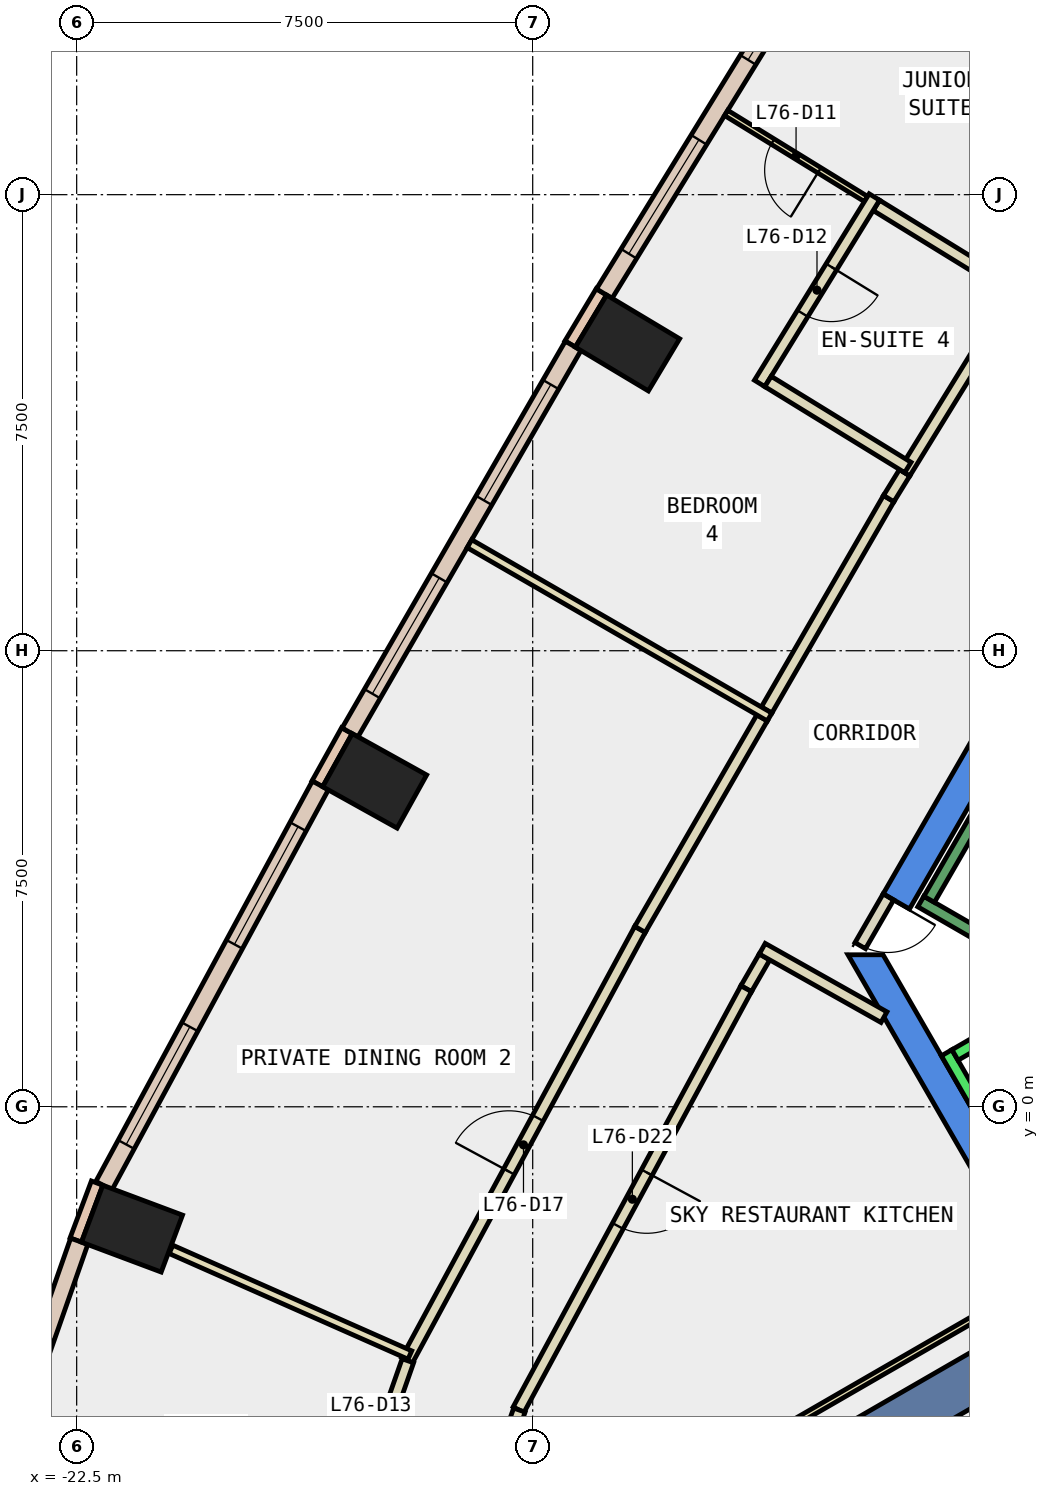
"""IFC4 building model, lengths in metres.
Left out: names, types, materials, properties, quantities, classifications, styles, units other than length and angle.
Written with IfcOpenShell. Run it as: python <this file> out.ifc"""

import sys

from ifc_helpers import new_model, si_unit, direction, frame, frame_2d, origin, origin_2d, place, context, subcontext, project, spatial, polyline, rectangle, outline, extrude, element, fill, save


model = new_model("IFC4")
c1 = context("Model", 3, precision=1e-05, world=origin(), true_north=direction((0.0, 1.0)))
c2 = subcontext(c1, "Body", "Model", "MODEL_VIEW")
j1 = project(units=[si_unit("LENGTHUNIT", "METRE"), si_unit("PLANEANGLEUNIT", "RADIAN")], contexts=[c1])
p1 = place(None, origin())
s1 = spatial("IfcSite", under=j1, at=p1, CompositionType="ELEMENT")
p2 = place(p1, origin())
s2 = spatial("IfcBuilding", under=s1, at=p2, CompositionType="ELEMENT")
p3 = place(p2, frame((0.0, 0.0, 322.4)))
s3 = spatial("IfcBuildingStorey", under=s2, at=p3, CompositionType="ELEMENT", Elevation=322.4)
for number, where, z_axis, x_axis in (
    (1, (-13.441, 12.561, -0.34), (0.0, 0.0, 1.0), (0.514, 0.858, 0.0)),
    (2, (-17.599, 5.36, -0.34), (0.0, 0.0, 1.0), (0.486, 0.874, 0.0)),
    (3, (-21.59, -2.004, -0.34), (0.0, 0.0, 1.0), (0.351, 0.936, 0.0)),
):
    element("IfcColumn", number, at=place(p3, frame(where, z_axis=z_axis, x_axis=x_axis)), inside=s3, PredefinedType="COLUMN", context=c2, shape_type="SweptSolid", body=[
        extrude(rectangle(XDim=1.0, YDim=1.4, at=origin_2d()), origin(), (0.0, 0.0, 1.0), 3.34),
    ])
p4 = place(p3, frame((0.0, 0.0, -0.34)))
e4 = element("IfcWall", 4, at=p4, inside=s3, PredefinedType="SHEAR", context=c2, shape_type="SweptSolid", body=[
    extrude(outline(polyline([(-9.236, 3.502), (-8.803, 3.253), (-4.619, 10.5), (-4.907, 11.0), (-9.236, 3.502)])), origin(), (0.0, 0.0, 1.0), 3.34),
])
p5 = place(p3, frame((0.0, 0.0, -0.34)))
e5 = element("IfcWall", 5, at=p5, inside=s3, PredefinedType="SHEAR", context=c2, shape_type="SweptSolid", body=[
    extrude(outline(polyline([(-9.815, 2.5), (-4.907, -6.0), (-4.619, -5.5), (-9.238, 2.5), (-9.815, 2.5)])), origin(), (0.0, 0.0, 1.0), 3.34),
])
p6 = place(p3, frame((-6.279, -3.625, -0.34), z_axis=(0.0, 0.0, 1.0), x_axis=(-0.866017533419, -0.500013631625, 0.0)))
e6 = element("IfcWall", 6, at=p6, inside=s3, PredefinedType="SHEAR", context=c2, shape_type="SweptSolid", body=[
    extrude(rectangle(XDim=9.0, YDim=0.8, at=frame_2d((4.5, 0.0))), origin(), (0.0, 0.0, 1.0), 3.34),
])
p7 = place(p3, frame((-13.87, 13.402, 0.0), z_axis=(0.0, 0.0, 1.0), x_axis=(-0.513777707721, -0.857923345672, 0.0)))
e7 = element("IfcWall", 7, at=p7, inside=s3, PredefinedType="STANDARD", context=c2, shape_type="SweptSolid", body=[
    extrude(rectangle(XDim=1.0, YDim=0.2, at=frame_2d((0.5, 0.0))), origin(), (0.0, 0.0, 1.0), 3.0),
])
p8 = place(p3, frame((-18.056, 6.185, 0.0), z_axis=(0.0, 0.0, 1.0), x_axis=(-0.486036693078, -0.873938403425, 0.0)))
e8 = element("IfcWall", 8, at=p8, inside=s3, PredefinedType="STANDARD", context=c2, shape_type="SweptSolid", body=[
    extrude(rectangle(XDim=1.0, YDim=0.2, at=frame_2d((0.5, 0.0))), origin(), (0.0, 0.0, 1.0), 3.0),
])
p9 = place(p3, frame((-22.164, -1.255, 0.0), z_axis=(0.0, 0.0, 1.0), x_axis=(-0.350962844851, -0.936389385637, 0.0)))
e9 = element("IfcWall", 9, at=p9, inside=s3, PredefinedType="STANDARD", context=c2, shape_type="SweptSolid", body=[
    extrude(rectangle(XDim=1.0, YDim=0.2, at=frame_2d((0.5, 0.0))), origin(), (0.0, 0.0, 1.0), 3.0),
])
p10 = place(p3, frame((-9.901, 19.747, 0.0), z_axis=(0.0, 0.0, 1.0), x_axis=(-0.524004608874, -0.851715427757, 0.0)))
e10 = element("IfcWall", 10, at=p10, inside=s3, PredefinedType="STANDARD", context=c2, shape_type="SweptSolid", body=[
    extrude(rectangle(XDim=7.485, YDim=0.3, at=frame_2d((3.742, 0.0))), origin(), (0.0, 0.0, 1.0), 3.0),
])
p11 = place(p10, frame((0.771, 0.0, 0.9)))
e11 = element("IfcOpeningElement", 11, at=p11, cuts=e10, PredefinedType="OPENING", context=c2, shape_type="SweptSolid", body=[
    extrude(rectangle(XDim=2.2, YDim=2.0, at=frame_2d((1.1, 1.0))), frame((0.0, 0.16, 0.0), z_axis=(0.0, -1.0, 0.0), x_axis=(1.0, 0.0, 0.0)), (0.0, 0.0, 1.0), 0.32),
])
p12 = place(p10, frame((4.514, 0.0, 0.9)))
e12 = element("IfcOpeningElement", 12, at=p12, cuts=e10, PredefinedType="OPENING", context=c2, shape_type="SweptSolid", body=[
    extrude(rectangle(XDim=2.2, YDim=2.0, at=frame_2d((1.1, 1.0))), frame((0.0, 0.16, 0.0), z_axis=(0.0, -1.0, 0.0), x_axis=(1.0, 0.0, 0.0)), (0.0, 0.0, 1.0), 0.32),
])
p13 = place(p3, frame((-14.334, 12.515, 0.0), z_axis=(0.0, 0.0, 1.0), x_axis=(-0.499958474759, -0.866049377066, 0.0)))
e13 = element("IfcWall", 13, at=p13, inside=s3, PredefinedType="STANDARD", context=c2, shape_type="SweptSolid", body=[
    extrude(rectangle(XDim=7.342, YDim=0.3, at=frame_2d((3.671, 0.0))), origin(), (0.0, 0.0, 1.0), 3.0),
])
p14 = place(p13, frame((0.736, 0.0, 0.9)))
e14 = element("IfcOpeningElement", 14, at=p14, cuts=e13, PredefinedType="OPENING", context=c2, shape_type="SweptSolid", body=[
    extrude(rectangle(XDim=2.2, YDim=2.0, at=frame_2d((1.1, 1.0))), frame((0.0, 0.16, 0.0), z_axis=(0.0, -1.0, 0.0), x_axis=(1.0, 0.0, 0.0)), (0.0, 0.0, 1.0), 0.32),
])
p15 = place(p13, frame((4.407, 0.0, 0.9)))
e15 = element("IfcOpeningElement", 15, at=p15, cuts=e13, PredefinedType="OPENING", context=c2, shape_type="SweptSolid", body=[
    extrude(rectangle(XDim=2.2, YDim=2.0, at=frame_2d((1.1, 1.0))), frame((0.0, 0.16, 0.0), z_axis=(0.0, -1.0, 0.0), x_axis=(1.0, 0.0, 0.0)), (0.0, 0.0, 1.0), 0.32),
])
p16 = place(p3, frame((-18.492, 5.285, 0.0), z_axis=(0.0, 0.0, 1.0), x_axis=(-0.475690331633, -0.879612817319, 0.0)))
e16 = element("IfcWall", 16, at=p16, inside=s3, PredefinedType="STANDARD", context=c2, shape_type="SweptSolid", body=[
    extrude(rectangle(XDim=7.484, YDim=0.3, at=frame_2d((3.742, 0.0))), origin(), (0.0, 0.0, 1.0), 3.0),
])
p17 = place(p16, frame((0.771, 0.0, 0.9)))
e17 = element("IfcOpeningElement", 17, at=p17, cuts=e16, PredefinedType="OPENING", context=c2, shape_type="SweptSolid", body=[
    extrude(rectangle(XDim=2.2, YDim=2.0, at=frame_2d((1.1, 1.0))), frame((0.0, 0.16, 0.0), z_axis=(0.0, -1.0, 0.0), x_axis=(1.0, 0.0, 0.0)), (0.0, 0.0, 1.0), 0.32),
])
p18 = place(p16, frame((4.513, 0.0, 0.9)))
e18 = element("IfcOpeningElement", 18, at=p18, cuts=e16, PredefinedType="OPENING", context=c2, shape_type="SweptSolid", body=[
    extrude(rectangle(XDim=2.2, YDim=2.0, at=frame_2d((1.1, 1.0))), frame((0.0, 0.16, 0.0), z_axis=(0.0, -1.0, 0.0), x_axis=(1.0, 0.0, 0.0)), (0.0, 0.0, 1.0), 0.32),
])
p19 = place(p3, frame((-22.458, -2.212, 0.0), z_axis=(0.0, 0.0, 1.0), x_axis=(-0.330923030855, -0.943657749213, 0.0)))
e19 = element("IfcWall", 19, at=p19, inside=s3, PredefinedType="STANDARD", context=c2, shape_type="SweptSolid", body=[
    extrude(rectangle(XDim=4.748, YDim=0.3, at=frame_2d((2.374, 0.0))), origin(), (0.0, 0.0, 1.0), 3.0),
])
p20 = place(p19, frame((1.674, 0.0, 0.9)))
e20 = element("IfcOpeningElement", 20, at=p20, cuts=e19, PredefinedType="OPENING", context=c2, shape_type="SweptSolid", body=[
    extrude(rectangle(XDim=1.4, YDim=2.0, at=frame_2d((0.7, 1.0))), frame((0.0, 0.16, 0.0), z_axis=(0.0, -1.0, 0.0), x_axis=(1.0, 0.0, 0.0)), (0.0, 0.0, 1.0), 0.32),
])
p21 = place(p3, frame((-11.188, 2.464, 0.0), z_axis=(0.0, 0.0, 1.0), x_axis=(-0.499406844493, -0.866367591542, 0.0)))
e21 = element("IfcWall", 21, at=p21, inside=s3, PredefinedType="PARTITIONING", context=c2, shape_type="SweptSolid", body=[
    extrude(rectangle(XDim=0.603, YDim=0.2, at=frame_2d((0.301, 0.0))), origin(), (0.0, 0.0, 1.0), 3.0),
])
p22 = place(p3, frame((-11.489, 1.942, 0.0), z_axis=(0.0, 0.0, 1.0), x_axis=(-0.475643534049, -0.879638123615, 0.0)))
e22 = element("IfcWall", 22, at=p22, inside=s3, PredefinedType="PARTITIONING", context=c2, shape_type="SweptSolid", body=[
    extrude(rectangle(XDim=7.871, YDim=0.2, at=frame_2d((3.936, 0.0))), origin(), (0.0, 0.0, 1.0), 3.0),
])
p23 = place(p22, frame((3.436, 0.0, 0.0)))
e23 = element("IfcOpeningElement", 23, at=p23, cuts=e22, PredefinedType="OPENING", context=c2, shape_type="SweptSolid", body=[
    extrude(rectangle(XDim=1.0, YDim=2.1, at=frame_2d((0.5, 1.05))), frame((0.0, 0.11, 0.0), z_axis=(0.0, -1.0, 0.0), x_axis=(1.0, 0.0, 0.0)), (0.0, 0.0, 1.0), 0.22),
])
p24 = place(p3, frame((-15.219, -4.988, 0.0), z_axis=(0.0, 0.0, 1.0), x_axis=(-0.330981563235, -0.943637220969, 0.0)))
e24 = element("IfcWall", 24, at=p24, inside=s3, PredefinedType="PARTITIONING", context=c2, shape_type="SweptSolid", body=[
    extrude(rectangle(XDim=2.946, YDim=0.2, at=frame_2d((1.473, 0.0))), origin(), (0.0, 0.0, 1.0), 3.0),
])
p25 = place(p3, frame((-9.223, 1.474, 0.0), z_axis=(0.0, 0.0, 1.0), x_axis=(-0.871623785844, 0.490175454251, 0.0)))
e25 = element("IfcWall", 25, at=p25, inside=s3, PredefinedType="PARTITIONING", context=c2, shape_type="SweptSolid", body=[
    extrude(rectangle(XDim=2.297, YDim=0.2, at=frame_2d((1.148, 0.0))), origin(), (0.0, 0.0, 1.0), 3.0),
])
p26 = place(p3, frame((-11.153, 6.525, 0.0), z_axis=(0.0, 0.0, 1.0), x_axis=(0.500108414701, 0.865962801479, 0.0)))
e26 = element("IfcWall", 26, at=p26, inside=s3, PredefinedType="PARTITIONING", context=c2, shape_type="SweptSolid", body=[
    extrude(rectangle(XDim=4.015, YDim=0.2, at=frame_2d((2.008, 0.0))), origin(), (0.0, 0.0, 1.0), 3.0),
])
p27 = place(p3, frame((-9.145, 10.002, 0.0), z_axis=(0.0, 0.0, 1.0), x_axis=(0.523797791684, 0.851842634192, 0.0)))
e27 = element("IfcWall", 27, at=p27, inside=s3, PredefinedType="PARTITIONING", context=c2, shape_type="SweptSolid", body=[
    extrude(rectangle(XDim=0.5, YDim=0.2, at=frame_2d((0.25, 0.0))), origin(), (0.0, 0.0, 1.0), 3.0),
])
p28 = place(p3, frame((-8.883, 10.428, 0.0), z_axis=(0.0, 0.0, 1.0), x_axis=(0.524061371587, 0.851680502777, 0.0)))
e28 = element("IfcWall", 28, at=p28, inside=s3, PredefinedType="PARTITIONING", context=c2, shape_type="SweptSolid", body=[
    extrude(rectangle(XDim=3.4, YDim=0.2, at=frame_2d((1.7, 0.0))), origin(), (0.0, 0.0, 1.0), 3.0),
])
p29 = place(p3, frame((-17.068, -4.17, 0.0), z_axis=(0.0, 0.0, 1.0), x_axis=(0.475681790703, 0.879617436158, 0.0)))
e29 = element("IfcWall", 29, at=p29, inside=s3, PredefinedType="PARTITIONING", context=c2, shape_type="SweptSolid", body=[
    extrude(rectangle(XDim=8.058, YDim=0.2, at=frame_2d((4.029, 0.0))), origin(), (0.0, 0.0, 1.0), 3.0),
])
p30 = place(p29, frame((3.529, 0.0, 0.0)))
e30 = element("IfcOpeningElement", 30, at=p30, cuts=e29, PredefinedType="OPENING", context=c2, shape_type="SweptSolid", body=[
    extrude(rectangle(XDim=1.0, YDim=2.1, at=frame_2d((0.5, 1.05))), frame((0.0, 0.11, 0.0), z_axis=(0.0, -1.0, 0.0), x_axis=(1.0, 0.0, 0.0)), (0.0, 0.0, 1.0), 0.22),
])
p31 = place(p3, frame((-13.235, 2.918, 0.0), z_axis=(0.0, 0.0, 1.0), x_axis=(0.49992599743, 0.866068124973, 0.0)))
e31 = element("IfcWall", 31, at=p31, inside=s3, PredefinedType="PARTITIONING", context=c2, shape_type="SweptSolid", body=[
    extrude(rectangle(XDim=4.015, YDim=0.2, at=frame_2d((2.007, 0.0))), origin(), (0.0, 0.0, 1.0), 3.0),
])
p32 = place(p3, frame((-18.271, -7.648, 0.0), z_axis=(0.0, 0.0, 1.0), x_axis=(0.33112192567, 0.943587977001, 0.0)))
e32 = element("IfcWall", 32, at=p32, inside=s3, PredefinedType="PARTITIONING", context=c2, shape_type="SweptSolid", body=[
    extrude(rectangle(XDim=3.678, YDim=0.2, at=frame_2d((1.839, 0.0))), origin(), (0.0, 0.0, 1.0), 3.0),
])
p33 = place(p32, frame((1.339, 0.0, 0.0)))
e33 = element("IfcOpeningElement", 33, at=p33, cuts=e32, PredefinedType="OPENING", context=c2, shape_type="SweptSolid", body=[
    extrude(rectangle(XDim=1.0, YDim=2.1, at=frame_2d((0.5, 1.05))), frame((0.0, 0.11, 0.0), z_axis=(0.0, -1.0, 0.0), x_axis=(1.0, 0.0, 0.0)), (0.0, 0.0, 1.0), 0.22),
])
p34 = place(p3, frame((-6.705, -2.887, 0.0), z_axis=(0.0, 0.0, 1.0), x_axis=(-0.866001397039, -0.500041578597, 0.0)))
e34 = element("IfcWall", 34, at=p34, inside=s3, PredefinedType="PARTITIONING", context=c2, shape_type="SweptSolid", body=[
    extrude(rectangle(XDim=6.998, YDim=0.1, at=frame_2d((3.499, 0.0))), origin(), (0.0, 0.0, 1.0), 3.0),
])
p35 = place(p3, frame((-4.893, 16.723, 0.0), z_axis=(0.0, 0.0, 1.0), x_axis=(-0.807632235509, 0.589686503294, 0.0)))
e35 = element("IfcWall", 35, at=p35, inside=s3, PredefinedType="PARTITIONING", context=c2, shape_type="SweptSolid", body=[
    extrude(rectangle(XDim=4.396, YDim=0.15, at=frame_2d((2.198, 0.0))), origin(), (0.0, 0.0, 1.0), 3.0),
])
p36 = place(p3, frame((-9.519, 14.929, 0.0), z_axis=(0.0, 0.0, 1.0), x_axis=(-0.851621054013, 0.524157972715, 0.0)))
e36 = element("IfcWall", 36, at=p36, inside=s3, PredefinedType="PARTITIONING", context=c2, shape_type="SweptSolid", body=[
    extrude(rectangle(XDim=2.7, YDim=0.1, at=frame_2d((1.35, 0.0))), origin(), (0.0, 0.0, 1.0), 3.0),
])
p37 = place(p36, frame((0.9, 0.0, 0.0)))
e37 = element("IfcOpeningElement", 37, at=p37, cuts=e36, PredefinedType="OPENING", context=c2, shape_type="SweptSolid", body=[
    extrude(rectangle(XDim=0.9, YDim=2.1, at=frame_2d((0.45, 1.05))), frame((0.0, 0.06, 0.0), z_axis=(0.0, -1.0, 0.0), x_axis=(1.0, 0.0, 0.0)), (0.0, 0.0, 1.0), 0.12),
])
p38 = place(p3, frame((-7.134, 13.462, 0.0), z_axis=(0.0, 0.0, 1.0), x_axis=(-0.851713135301, 0.524008335007, 0.0)))
e38 = element("IfcWall", 38, at=p38, inside=s3, PredefinedType="PARTITIONING", context=c2, shape_type="SweptSolid", body=[
    extrude(rectangle(XDim=2.599, YDim=0.2, at=frame_2d((1.3, 0.0))), origin(), (0.0, 0.0, 1.0), 3.0),
])
p39 = place(p3, frame((-9.381, 14.962, 0.0), z_axis=(0.0, 0.0, 1.0), x_axis=(-0.524146612914, -0.851628045669, 0.0)))
e39 = element("IfcWall", 39, at=p39, inside=s3, PredefinedType="PARTITIONING", context=c2, shape_type="SweptSolid", body=[
    extrude(rectangle(XDim=3.6, YDim=0.2, at=frame_2d((1.8, 0.0))), origin(), (0.0, 0.0, 1.0), 3.0),
])
p40 = place(p39, frame((1.35, 0.0, 0.0)))
e40 = element("IfcOpeningElement", 40, at=p40, cuts=e39, PredefinedType="OPENING", context=c2, shape_type="SweptSolid", body=[
    extrude(rectangle(XDim=0.9, YDim=2.1, at=frame_2d((0.45, 1.05))), frame((0.0, 0.11, 0.0), z_axis=(0.0, -1.0, 0.0), x_axis=(1.0, 0.0, 0.0)), (0.0, 0.0, 1.0), 0.22),
])
p41 = place(p3, frame((-11.13, 11.928, 0.0), z_axis=(0.0, 0.0, 1.0), x_axis=(0.851856970107, -0.523774476737, 0.0)))
e41 = element("IfcWall", 41, at=p41, inside=s3, PredefinedType="PARTITIONING", context=c2, shape_type="SweptSolid", body=[
    extrude(rectangle(XDim=2.7, YDim=0.2, at=frame_2d((1.35, 0.0))), origin(), (0.0, 0.0, 1.0), 3.0),
])
p42 = place(p3, frame((-11.104, 6.41, 0.0), z_axis=(0.0, 0.0, 1.0), x_axis=(-0.866004402611, 0.500036373335, 0.0)))
e42 = element("IfcWall", 42, at=p42, inside=s3, PredefinedType="PARTITIONING", context=c2, shape_type="SweptSolid", body=[
    extrude(rectangle(XDim=5.7, YDim=0.15, at=frame_2d((2.85, 0.0))), origin(), (0.0, 0.0, 1.0), 3.0),
])
p43 = place(p3, frame((-17.02, -4.082, 0.0), z_axis=(0.0, 0.0, 1.0), x_axis=(-0.914599611743, 0.404360668462, 0.0)))
e43 = element("IfcWall", 43, at=p43, inside=s3, PredefinedType="PARTITIONING", context=c2, shape_type="SweptSolid", body=[
    extrude(rectangle(XDim=4.296, YDim=0.15, at=frame_2d((2.148, 0.0))), origin(), (0.0, 0.0, 1.0), 3.0),
])
p44 = place(p3, frame((-9.15, 3.452, 0.0), z_axis=(0.0, 0.0, 1.0), x_axis=(-0.500079945886, -0.865979242085, 0.0)))
e44 = element("IfcWall", 44, at=p44, inside=s3, PredefinedType="PARTITIONING", context=c2, shape_type="SweptSolid", body=[
    extrude(rectangle(XDim=0.926, YDim=0.2, at=frame_2d((0.463, 0.0))), origin(), (0.0, 0.0, 1.0), 2.4),
])
p45 = place(p44, frame((0.017, 0.0, 0.0)))
e45 = element("IfcOpeningElement", 45, at=p45, cuts=e44, PredefinedType="OPENING", context=c2, shape_type="SweptSolid", body=[
    extrude(rectangle(XDim=0.9, YDim=2.1, at=frame_2d((0.45, 1.05))), frame((0.0, 0.11, 0.0), z_axis=(0.0, -1.0, 0.0), x_axis=(1.0, 0.0, 0.0)), (0.0, 0.0, 1.0), 0.22),
])
p46 = place(p3, frame((-8.192, 0.888, 0.0), z_axis=(0.0, 0.0, 1.0), x_axis=(0.500034260056, -0.866005622828, 0.0)))
e46 = element("IfcWall", 46, at=p46, inside=s3, PredefinedType="STANDARD", context=c2, shape_type="SweptSolid", body=[
    extrude(rectangle(XDim=5.399, YDim=0.2, at=frame_2d((2.7, 0.0))), origin(), (0.0, 0.0, 1.0), 3.0),
])
p47 = place(p3, frame((-5.977, 2.052, 0.0), z_axis=(0.0, 0.0, 1.0), x_axis=(-0.865973769406, -0.500089422704, 0.0)))
e47 = element("IfcWall", 47, at=p47, inside=s3, PredefinedType="STANDARD", context=c2, shape_type="SweptSolid", body=[
    extrude(rectangle(XDim=2.399, YDim=0.2, at=frame_2d((1.2, 0.0))), origin(), (0.0, 0.0, 1.0), 3.0),
])
p48 = place(p3, frame((-6.25, 2.01, 0.0), z_axis=(0.0, 0.0, 1.0), x_axis=(-0.86611865017, 0.499838457731, 0.0)))
e48 = element("IfcWall", 48, at=p48, inside=s3, PredefinedType="STANDARD", context=c2, shape_type="SweptSolid", body=[
    extrude(rectangle(XDim=2.733, YDim=0.2, at=frame_2d((1.366, 0.0))), origin(), (0.0, 0.0, 1.0), 3.0),
])
p49 = place(p3, frame((-5.03, 9.388, 0.0), z_axis=(0.0, 0.0, 1.0), x_axis=(-0.499978703459, -0.866037698999, 0.0)))
e49 = element("IfcWall", 49, at=p49, inside=s3, PredefinedType="STANDARD", context=c2, shape_type="SweptSolid", body=[
    extrude(rectangle(XDim=6.9, YDim=0.2, at=frame_2d((3.45, 0.0))), origin(), (0.0, 0.0, 1.0), 3.0),
])
p50 = place(p11, origin())
e50 = element("IfcWindow", 50, at=p50, inside=s3, PartitioningType="SINGLE_PANEL", PredefinedType="WINDOW", context=c2, shape_type="SweptSolid", body=[
    extrude(rectangle(XDim=2.2, YDim=2.0, at=frame_2d((1.1, 1.0))), frame((0.0, 0.03, 0.0), z_axis=(0.0, -1.0, 0.0), x_axis=(1.0, 0.0, 0.0)), (0.0, 0.0, 1.0), 0.06),
])
fill(e11, e50)
p51 = place(p12, origin())
e51 = element("IfcWindow", 51, at=p51, inside=s3, PartitioningType="SINGLE_PANEL", PredefinedType="WINDOW", context=c2, shape_type="SweptSolid", body=[
    extrude(rectangle(XDim=2.2, YDim=2.0, at=frame_2d((1.1, 1.0))), frame((0.0, 0.03, 0.0), z_axis=(0.0, -1.0, 0.0), x_axis=(1.0, 0.0, 0.0)), (0.0, 0.0, 1.0), 0.06),
])
fill(e12, e51)
p52 = place(p14, origin())
e52 = element("IfcWindow", 52, at=p52, inside=s3, PartitioningType="SINGLE_PANEL", PredefinedType="WINDOW", context=c2, shape_type="SweptSolid", body=[
    extrude(rectangle(XDim=2.2, YDim=2.0, at=frame_2d((1.1, 1.0))), frame((0.0, 0.03, 0.0), z_axis=(0.0, -1.0, 0.0), x_axis=(1.0, 0.0, 0.0)), (0.0, 0.0, 1.0), 0.06),
])
fill(e14, e52)
p53 = place(p15, origin())
e53 = element("IfcWindow", 53, at=p53, inside=s3, PartitioningType="SINGLE_PANEL", PredefinedType="WINDOW", context=c2, shape_type="SweptSolid", body=[
    extrude(rectangle(XDim=2.2, YDim=2.0, at=frame_2d((1.1, 1.0))), frame((0.0, 0.03, 0.0), z_axis=(0.0, -1.0, 0.0), x_axis=(1.0, 0.0, 0.0)), (0.0, 0.0, 1.0), 0.06),
])
fill(e15, e53)
p54 = place(p17, origin())
e54 = element("IfcWindow", 54, at=p54, inside=s3, PartitioningType="SINGLE_PANEL", PredefinedType="WINDOW", context=c2, shape_type="SweptSolid", body=[
    extrude(rectangle(XDim=2.2, YDim=2.0, at=frame_2d((1.1, 1.0))), frame((0.0, 0.03, 0.0), z_axis=(0.0, -1.0, 0.0), x_axis=(1.0, 0.0, 0.0)), (0.0, 0.0, 1.0), 0.06),
])
fill(e17, e54)
p55 = place(p18, origin())
e55 = element("IfcWindow", 55, at=p55, inside=s3, PartitioningType="SINGLE_PANEL", PredefinedType="WINDOW", context=c2, shape_type="SweptSolid", body=[
    extrude(rectangle(XDim=2.2, YDim=2.0, at=frame_2d((1.1, 1.0))), frame((0.0, 0.03, 0.0), z_axis=(0.0, -1.0, 0.0), x_axis=(1.0, 0.0, 0.0)), (0.0, 0.0, 1.0), 0.06),
])
fill(e18, e55)
p56 = place(p37, origin())
e56 = element("IfcDoor", 56, at=p56, inside=s3, OperationType="SINGLE_SWING_RIGHT", PredefinedType="DOOR", context=c2, shape_type="SweptSolid", body=[
    extrude(rectangle(XDim=0.9, YDim=2.1, at=frame_2d((0.45, 1.05))), frame((0.0, 0.025, 0.0), z_axis=(0.0, -1.0, 0.0), x_axis=(1.0, 0.0, 0.0)), (0.0, 0.0, 1.0), 0.05),
])
fill(e37, e56)
p57 = place(p40, origin())
e57 = element("IfcDoor", 57, at=p57, inside=s3, OperationType="SINGLE_SWING_RIGHT", PredefinedType="DOOR", context=c2, shape_type="SweptSolid", body=[
    extrude(rectangle(XDim=0.9, YDim=2.1, at=frame_2d((0.45, 1.05))), frame((0.0, 0.025, 0.0), z_axis=(0.0, -1.0, 0.0), x_axis=(1.0, 0.0, 0.0)), (0.0, 0.0, 1.0), 0.05),
])
fill(e40, e57)
p58 = place(p30, origin())
e58 = element("IfcDoor", 58, at=p58, inside=s3, OperationType="SINGLE_SWING_LEFT", PredefinedType="DOOR", context=c2, shape_type="SweptSolid", body=[
    extrude(rectangle(XDim=1.0, YDim=2.1, at=frame_2d((0.5, 1.05))), frame((0.0, 0.025, 0.0), z_axis=(0.0, -1.0, 0.0), x_axis=(1.0, 0.0, 0.0)), (0.0, 0.0, 1.0), 0.05),
])
fill(e30, e58)
p59 = place(p23, origin())
e59 = element("IfcDoor", 59, at=p59, inside=s3, OperationType="SINGLE_SWING_LEFT", PredefinedType="DOOR", context=c2, shape_type="SweptSolid", body=[
    extrude(rectangle(XDim=1.0, YDim=2.1, at=frame_2d((0.5, 1.05))), frame((0.0, 0.025, 0.0), z_axis=(0.0, -1.0, 0.0), x_axis=(1.0, 0.0, 0.0)), (0.0, 0.0, 1.0), 0.05),
])
fill(e23, e59)
p60 = place(p45, origin())
e60 = element("IfcDoor", 60, at=p60, inside=s3, OperationType="SINGLE_SWING_LEFT", PredefinedType="DOOR", context=c2, shape_type="SweptSolid", body=[
    extrude(rectangle(XDim=0.9, YDim=2.1, at=frame_2d((0.45, 1.05))), frame((0.0, 0.025, 0.0), z_axis=(0.0, -1.0, 0.0), x_axis=(1.0, 0.0, 0.0)), (0.0, 0.0, 1.0), 0.05),
])
fill(e45, e60)
save(model, sys.argv[1])
